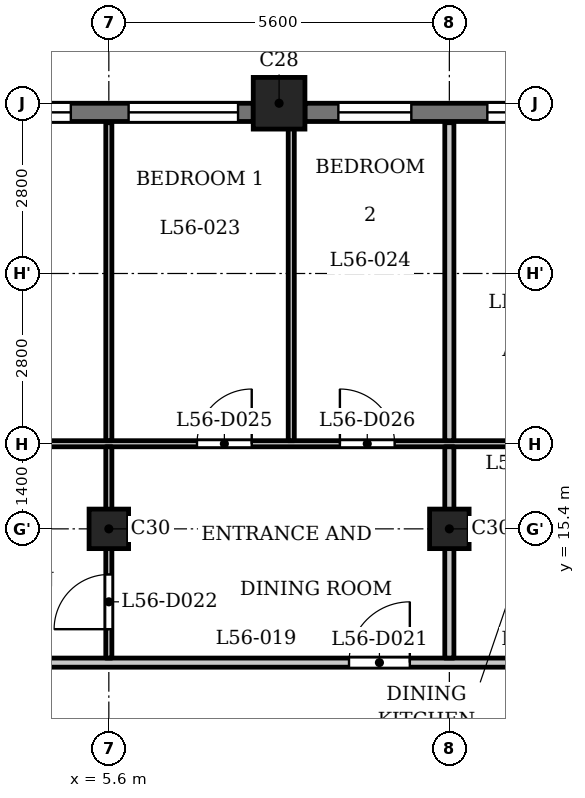
"""IFC4 building model, lengths in metres.
Left out: names, types, materials, properties, quantities, classifications, styles, units other than length and angle.
Written with IfcOpenShell. Run it as: python <this file> out.ifc"""

import sys

from ifc_helpers import new_model, si_unit, direction, frame, frame_2d, origin, origin_2d, place, context, subcontext, project, spatial, rectangle, extrude, element, fill, save


model = new_model("IFC4")
c1 = context("Model", 3, precision=1e-05, world=origin(), true_north=direction((0.0, 1.0)))
c2 = subcontext(c1, "Body", "Model", "MODEL_VIEW")
j1 = project(units=[si_unit("LENGTHUNIT", "METRE"), si_unit("PLANEANGLEUNIT", "RADIAN")], contexts=[c1])
p1 = place(None, origin())
s1 = spatial("IfcSite", under=j1, at=p1, CompositionType="ELEMENT")
p2 = place(p1, origin())
s2 = spatial("IfcBuilding", under=s1, at=p2, CompositionType="ELEMENT")
p3 = place(p2, frame((0.0, 0.0, 216.9)))
s3 = spatial("IfcBuildingStorey", under=s2, at=p3, CompositionType="ELEMENT", Elevation=216.9)
p4 = place(p3, frame((8.4, 22.4, 0.0), z_axis=(0.0, 0.0, 1.0), x_axis=(1.0, 0.0, 0.0)))
e1 = element("IfcColumn", 1, at=p4, inside=s3, PredefinedType="COLUMN", context=c2, shape_type="SweptSolid", body=[
    extrude(rectangle(XDim=0.85, YDim=0.85, at=origin_2d()), origin(), (0.0, 0.0, 1.0), 3.5),
])
for number, where, z_axis, x_axis in (
    (2, (5.6, 15.4, 0.0), (0.0, 0.0, 1.0), (1.0, 0.0, 0.0)),
    (3, (11.2, 15.4, 0.0), (0.0, 0.0, 1.0), (1.0, 0.0, 0.0)),
):
    element("IfcColumn", number, at=place(p3, frame(where, z_axis=z_axis, x_axis=x_axis)), inside=s3, PredefinedType="COLUMN", context=c2, shape_type="SweptSolid", body=[
        extrude(rectangle(XDim=0.65, YDim=0.65, at=origin_2d()), origin(), (0.0, 0.0, 1.0), 3.5),
    ])
p5 = place(p3, frame((13.575, 22.25, 0.0), z_axis=(0.0, 0.0, 1.0), x_axis=(-1.0, 0.0, 0.0)))
e4 = element("IfcWall", 4, at=p5, inside=s3, PredefinedType="SOLIDWALL", context=c2, shape_type="SweptSolid", body=[
    extrude(rectangle(XDim=4.75, YDim=0.3, at=frame_2d((2.375, 0.0))), origin(), (0.0, 0.0, 1.0), 2.5),
])
p6 = place(p5, frame((0.55, 0.0, 0.6)))
e5 = element("IfcOpeningElement", 5, at=p6, cuts=e4, PredefinedType="OPENING", context=c2, shape_type="SweptSolid", body=[
    extrude(rectangle(XDim=1.2, YDim=1.55, at=frame_2d((0.6, 0.775))), frame((0.0, 0.16, 0.0), z_axis=(0.0, -1.0, 0.0), x_axis=(1.0, 0.0, 0.0)), (0.0, 0.0, 1.0), 0.32),
])
p7 = place(p5, frame((3.0, 0.0, 0.6)))
e6 = element("IfcOpeningElement", 6, at=p7, cuts=e4, PredefinedType="OPENING", context=c2, shape_type="SweptSolid", body=[
    extrude(rectangle(XDim=1.2, YDim=1.55, at=frame_2d((0.6, 0.775))), frame((0.0, 0.16, 0.0), z_axis=(0.0, -1.0, 0.0), x_axis=(1.0, 0.0, 0.0)), (0.0, 0.0, 1.0), 0.32),
])
p8 = place(p3, frame((7.975, 22.25, 0.0), z_axis=(0.0, 0.0, 1.0), x_axis=(-1.0, 0.0, 0.0)))
e7 = element("IfcWall", 7, at=p8, inside=s3, PredefinedType="SOLIDWALL", context=c2, shape_type="SweptSolid", body=[
    extrude(rectangle(XDim=4.75, YDim=0.3, at=frame_2d((2.375, 0.0))), origin(), (0.0, 0.0, 1.0), 2.5),
])
p9 = place(p8, frame((0.25, 0.0, 0.9)))
e8 = element("IfcOpeningElement", 8, at=p9, cuts=e7, PredefinedType="OPENING", context=c2, shape_type="SweptSolid", body=[
    extrude(rectangle(XDim=1.8, YDim=1.25, at=frame_2d((0.9, 0.625))), frame((0.0, 0.16, 0.0), z_axis=(0.0, -1.0, 0.0), x_axis=(1.0, 0.0, 0.0)), (0.0, 0.0, 1.0), 0.32),
])
p10 = place(p8, frame((3.0, 0.0, 0.6)))
e9 = element("IfcOpeningElement", 9, at=p10, cuts=e7, PredefinedType="OPENING", context=c2, shape_type="SweptSolid", body=[
    extrude(rectangle(XDim=1.2, YDim=1.55, at=frame_2d((0.6, 0.775))), frame((0.0, 0.16, 0.0), z_axis=(0.0, -1.0, 0.0), x_axis=(1.0, 0.0, 0.0)), (0.0, 0.0, 1.0), 0.32),
])
p11 = place(p3, frame((-17.4, 13.2, 0.0), z_axis=(0.0, 0.0, 1.0), x_axis=(1.0, 0.0, 0.0)))
e10 = element("IfcWall", 10, at=p11, inside=s3, PredefinedType="PARTITIONING", context=c2, shape_type="SweptSolid", body=[
    extrude(rectangle(XDim=34.8, YDim=0.15, at=frame_2d((17.4, 0.0))), origin(), (0.0, 0.0, 1.0), 3.2),
])
p12 = place(p11, frame((0.25, 0.0, 0.0)))
e11 = element("IfcOpeningElement", 11, at=p12, cuts=e10, PredefinedType="OPENING", context=c2, shape_type="SweptSolid", body=[
    extrude(rectangle(XDim=1.0, YDim=2.1, at=frame_2d((0.5, 1.05))), frame((0.0, 0.085, 0.0), z_axis=(0.0, -1.0, 0.0), x_axis=(1.0, 0.0, 0.0)), (0.0, 0.0, 1.0), 0.17),
])
p13 = place(p11, frame((33.65, 0.0, 0.0)))
e12 = element("IfcOpeningElement", 12, at=p13, cuts=e10, PredefinedType="OPENING", context=c2, shape_type="SweptSolid", body=[
    extrude(rectangle(XDim=1.0, YDim=2.1, at=frame_2d((0.5, 1.05))), frame((0.0, 0.085, 0.0), z_axis=(0.0, -1.0, 0.0), x_axis=(1.0, 0.0, 0.0)), (0.0, 0.0, 1.0), 0.17),
])
p14 = place(p11, frame((15.75, 0.0, 0.0)))
e13 = element("IfcOpeningElement", 13, at=p14, cuts=e10, PredefinedType="OPENING", context=c2, shape_type="SweptSolid", body=[
    extrude(rectangle(XDim=1.0, YDim=2.1, at=frame_2d((0.5, 1.05))), frame((0.0, 0.085, 0.0), z_axis=(0.0, -1.0, 0.0), x_axis=(1.0, 0.0, 0.0)), (0.0, 0.0, 1.0), 0.17),
])
p15 = place(p11, frame((26.95, 0.0, 0.0)))
e14 = element("IfcOpeningElement", 14, at=p15, cuts=e10, PredefinedType="OPENING", context=c2, shape_type="SweptSolid", body=[
    extrude(rectangle(XDim=1.0, YDim=2.1, at=frame_2d((0.5, 1.05))), frame((0.0, 0.085, 0.0), z_axis=(0.0, -1.0, 0.0), x_axis=(1.0, 0.0, 0.0)), (0.0, 0.0, 1.0), 0.17),
])
p16 = place(p11, frame((29.75, 0.0, 0.0)))
e15 = element("IfcOpeningElement", 15, at=p16, cuts=e10, PredefinedType="OPENING", context=c2, shape_type="SweptSolid", body=[
    extrude(rectangle(XDim=1.0, YDim=2.1, at=frame_2d((0.5, 1.05))), frame((0.0, 0.085, 0.0), z_axis=(0.0, -1.0, 0.0), x_axis=(1.0, 0.0, 0.0)), (0.0, 0.0, 1.0), 0.17),
])
p17 = place(p3, frame((-16.725, 16.8, 0.0), z_axis=(0.0, 0.0, 1.0), x_axis=(1.0, 0.0, 0.0)))
e16 = element("IfcWall", 16, at=p17, inside=s3, PredefinedType="PARTITIONING", context=c2, shape_type="SweptSolid", body=[
    extrude(rectangle(XDim=33.45, YDim=0.1, at=frame_2d((16.725, 0.0))), origin(), (0.0, 0.0, 1.0), 3.2),
])
p18 = place(p17, frame((11.675, 0.0, 0.0)))
e17 = element("IfcOpeningElement", 17, at=p18, cuts=e16, PredefinedType="OPENING", context=c2, shape_type="SweptSolid", body=[
    extrude(rectangle(XDim=0.9, YDim=2.1, at=frame_2d((0.45, 1.05))), frame((0.0, 0.06, 0.0), z_axis=(0.0, -1.0, 0.0), x_axis=(1.0, 0.0, 0.0)), (0.0, 0.0, 1.0), 0.12),
])
p19 = place(p17, frame((9.575, 0.0, 0.0)))
e18 = element("IfcOpeningElement", 18, at=p19, cuts=e16, PredefinedType="OPENING", context=c2, shape_type="SweptSolid", body=[
    extrude(rectangle(XDim=0.9, YDim=2.1, at=frame_2d((0.45, 1.05))), frame((0.0, 0.06, 0.0), z_axis=(0.0, -1.0, 0.0), x_axis=(1.0, 0.0, 0.0)), (0.0, 0.0, 1.0), 0.12),
])
p20 = place(p17, frame((17.375, 0.0, 0.0)))
e19 = element("IfcOpeningElement", 19, at=p20, cuts=e16, PredefinedType="OPENING", context=c2, shape_type="SweptSolid", body=[
    extrude(rectangle(XDim=0.8, YDim=2.1, at=frame_2d((0.4, 1.05))), frame((0.0, 0.06, 0.0), z_axis=(0.0, -1.0, 0.0), x_axis=(1.0, 0.0, 0.0)), (0.0, 0.0, 1.0), 0.12),
])
p21 = place(p17, frame((19.525, 0.0, 0.0)))
e20 = element("IfcOpeningElement", 20, at=p21, cuts=e16, PredefinedType="OPENING", context=c2, shape_type="SweptSolid", body=[
    extrude(rectangle(XDim=0.9, YDim=2.1, at=frame_2d((0.45, 1.05))), frame((0.0, 0.06, 0.0), z_axis=(0.0, -1.0, 0.0), x_axis=(1.0, 0.0, 0.0)), (0.0, 0.0, 1.0), 0.12),
])
p22 = place(p17, frame((23.775, 0.0, 0.0)))
e21 = element("IfcOpeningElement", 21, at=p22, cuts=e16, PredefinedType="OPENING", context=c2, shape_type="SweptSolid", body=[
    extrude(rectangle(XDim=0.9, YDim=2.1, at=frame_2d((0.45, 1.05))), frame((0.0, 0.06, 0.0), z_axis=(0.0, -1.0, 0.0), x_axis=(1.0, 0.0, 0.0)), (0.0, 0.0, 1.0), 0.12),
])
p23 = place(p17, frame((26.125, 0.0, 0.0)))
e22 = element("IfcOpeningElement", 22, at=p23, cuts=e16, PredefinedType="OPENING", context=c2, shape_type="SweptSolid", body=[
    extrude(rectangle(XDim=0.9, YDim=2.1, at=frame_2d((0.45, 1.05))), frame((0.0, 0.06, 0.0), z_axis=(0.0, -1.0, 0.0), x_axis=(1.0, 0.0, 0.0)), (0.0, 0.0, 1.0), 0.12),
])
p24 = place(p17, frame((32.075, 0.0, 0.0)))
e23 = element("IfcOpeningElement", 23, at=p24, cuts=e16, PredefinedType="OPENING", context=c2, shape_type="SweptSolid", body=[
    extrude(rectangle(XDim=0.8, YDim=2.1, at=frame_2d((0.4, 1.05))), frame((0.0, 0.06, 0.0), z_axis=(0.0, -1.0, 0.0), x_axis=(1.0, 0.0, 0.0)), (0.0, 0.0, 1.0), 0.12),
])
p25 = place(p17, frame((29.175, 0.0, 0.0)))
e24 = element("IfcOpeningElement", 24, at=p25, cuts=e16, PredefinedType="OPENING", context=c2, shape_type="SweptSolid", body=[
    extrude(rectangle(XDim=0.9, YDim=2.1, at=frame_2d((0.45, 1.05))), frame((0.0, 0.06, 0.0), z_axis=(0.0, -1.0, 0.0), x_axis=(1.0, 0.0, 0.0)), (0.0, 0.0, 1.0), 0.12),
])
p26 = place(p3, frame((5.6, 13.275, 0.0), z_axis=(0.0, 0.0, 1.0), x_axis=(0.0, 1.0, 0.0)))
e25 = element("IfcWall", 25, at=p26, inside=s3, PredefinedType="PARTITIONING", context=c2, shape_type="SweptSolid", body=[
    extrude(rectangle(XDim=3.475, YDim=0.1, at=frame_2d((1.738, 0.0))), origin(), (0.0, 0.0, 1.0), 3.2),
])
p27 = place(p26, frame((0.475, 0.0, 0.0)))
e26 = element("IfcOpeningElement", 26, at=p27, cuts=e25, PredefinedType="OPENING", context=c2, shape_type="SweptSolid", body=[
    extrude(rectangle(XDim=0.9, YDim=2.1, at=frame_2d((0.45, 1.05))), frame((0.0, 0.06, 0.0), z_axis=(0.0, -1.0, 0.0), x_axis=(1.0, 0.0, 0.0)), (0.0, 0.0, 1.0), 0.12),
])
p28 = place(p3, frame((5.6, 16.85, 0.0), z_axis=(0.0, 0.0, 1.0), x_axis=(0.0, 1.0, 0.0)))
e27 = element("IfcWall", 27, at=p28, inside=s3, PredefinedType="PARTITIONING", context=c2, shape_type="SweptSolid", body=[
    extrude(rectangle(XDim=5.23, YDim=0.1, at=frame_2d((2.615, 0.0))), origin(), (0.0, 0.0, 1.0), 3.2),
])
p29 = place(p3, frame((8.6, 16.85, 0.0), z_axis=(0.0, 0.0, 1.0), x_axis=(0.0, 1.0, 0.0)))
e28 = element("IfcWall", 28, at=p29, inside=s3, PredefinedType="PARTITIONING", context=c2, shape_type="SweptSolid", body=[
    extrude(rectangle(XDim=5.955, YDim=0.1, at=frame_2d((2.978, 0.0))), origin(), (0.0, 0.0, 1.0), 3.2),
])
p30 = place(p3, frame((11.2, 13.275, 0.0), z_axis=(0.0, 0.0, 1.0), x_axis=(0.0, 1.0, 0.0)))
e29 = element("IfcWall", 29, at=p30, inside=s3, PredefinedType="PARTITIONING", context=c2, shape_type="SweptSolid", body=[
    extrude(rectangle(XDim=3.475, YDim=0.15, at=frame_2d((1.738, 0.0))), origin(), (0.0, 0.0, 1.0), 3.2),
])
p31 = place(p3, frame((11.2, 16.85, 0.0), z_axis=(0.0, 0.0, 1.0), x_axis=(0.0, 1.0, 0.0)))
e30 = element("IfcWall", 30, at=p31, inside=s3, PredefinedType="PARTITIONING", context=c2, shape_type="SweptSolid", body=[
    extrude(rectangle(XDim=5.23, YDim=0.15, at=frame_2d((2.615, 0.0))), origin(), (0.0, 0.0, 1.0), 3.2),
])
p32 = place(p15, origin())
e31 = element("IfcDoor", 31, at=p32, inside=s3, OperationType="SINGLE_SWING_LEFT", PredefinedType="DOOR", context=c2, shape_type="SweptSolid", body=[
    extrude(rectangle(XDim=1.0, YDim=2.1, at=frame_2d((0.5, 1.05))), frame((0.0, 0.025, 0.0), z_axis=(0.0, -1.0, 0.0), x_axis=(1.0, 0.0, 0.0)), (0.0, 0.0, 1.0), 0.05),
])
fill(e14, e31)
p33 = place(p27, origin())
e32 = element("IfcDoor", 32, at=p33, inside=s3, OperationType="SINGLE_SWING_RIGHT", PredefinedType="DOOR", context=c2, shape_type="SweptSolid", body=[
    extrude(rectangle(XDim=0.9, YDim=2.1, at=frame_2d((0.45, 1.05))), frame((0.0, 0.025, 0.0), z_axis=(0.0, -1.0, 0.0), x_axis=(1.0, 0.0, 0.0)), (0.0, 0.0, 1.0), 0.05),
])
fill(e26, e32)
p34 = place(p22, origin())
e33 = element("IfcDoor", 33, at=p34, inside=s3, OperationType="SINGLE_SWING_LEFT", PredefinedType="DOOR", context=c2, shape_type="SweptSolid", body=[
    extrude(rectangle(XDim=0.9, YDim=2.1, at=frame_2d((0.45, 1.05))), frame((0.0, 0.025, 0.0), z_axis=(0.0, -1.0, 0.0), x_axis=(1.0, 0.0, 0.0)), (0.0, 0.0, 1.0), 0.05),
])
fill(e21, e33)
p35 = place(p23, origin())
e34 = element("IfcDoor", 34, at=p35, inside=s3, OperationType="SINGLE_SWING_RIGHT", PredefinedType="DOOR", context=c2, shape_type="SweptSolid", body=[
    extrude(rectangle(XDim=0.9, YDim=2.1, at=frame_2d((0.45, 1.05))), frame((0.0, 0.025, 0.0), z_axis=(0.0, -1.0, 0.0), x_axis=(1.0, 0.0, 0.0)), (0.0, 0.0, 1.0), 0.05),
])
fill(e22, e34)
p36 = place(p6, origin())
e35 = element("IfcWindow", 35, at=p36, inside=s3, PartitioningType="SINGLE_PANEL", PredefinedType="WINDOW", context=c2, shape_type="SweptSolid", body=[
    extrude(rectangle(XDim=1.2, YDim=1.55, at=frame_2d((0.6, 0.775))), frame((0.0, 0.03, 0.0), z_axis=(0.0, -1.0, 0.0), x_axis=(1.0, 0.0, 0.0)), (0.0, 0.0, 1.0), 0.06),
])
fill(e5, e35)
p37 = place(p7, origin())
e36 = element("IfcWindow", 36, at=p37, inside=s3, PartitioningType="SINGLE_PANEL", PredefinedType="WINDOW", context=c2, shape_type="SweptSolid", body=[
    extrude(rectangle(XDim=1.2, YDim=1.55, at=frame_2d((0.6, 0.775))), frame((0.0, 0.03, 0.0), z_axis=(0.0, -1.0, 0.0), x_axis=(1.0, 0.0, 0.0)), (0.0, 0.0, 1.0), 0.06),
])
fill(e6, e36)
p38 = place(p9, origin())
e37 = element("IfcWindow", 37, at=p38, inside=s3, PartitioningType="SINGLE_PANEL", PredefinedType="WINDOW", context=c2, shape_type="SweptSolid", body=[
    extrude(rectangle(XDim=1.8, YDim=1.25, at=frame_2d((0.9, 0.625))), frame((0.0, 0.03, 0.0), z_axis=(0.0, -1.0, 0.0), x_axis=(1.0, 0.0, 0.0)), (0.0, 0.0, 1.0), 0.06),
])
fill(e8, e37)
p39 = place(p10, origin())
e38 = element("IfcWindow", 38, at=p39, inside=s3, PartitioningType="SINGLE_PANEL", PredefinedType="WINDOW", context=c2, shape_type="SweptSolid", body=[
    extrude(rectangle(XDim=1.2, YDim=1.55, at=frame_2d((0.6, 0.775))), frame((0.0, 0.03, 0.0), z_axis=(0.0, -1.0, 0.0), x_axis=(1.0, 0.0, 0.0)), (0.0, 0.0, 1.0), 0.06),
])
fill(e9, e38)
save(model, sys.argv[1])
